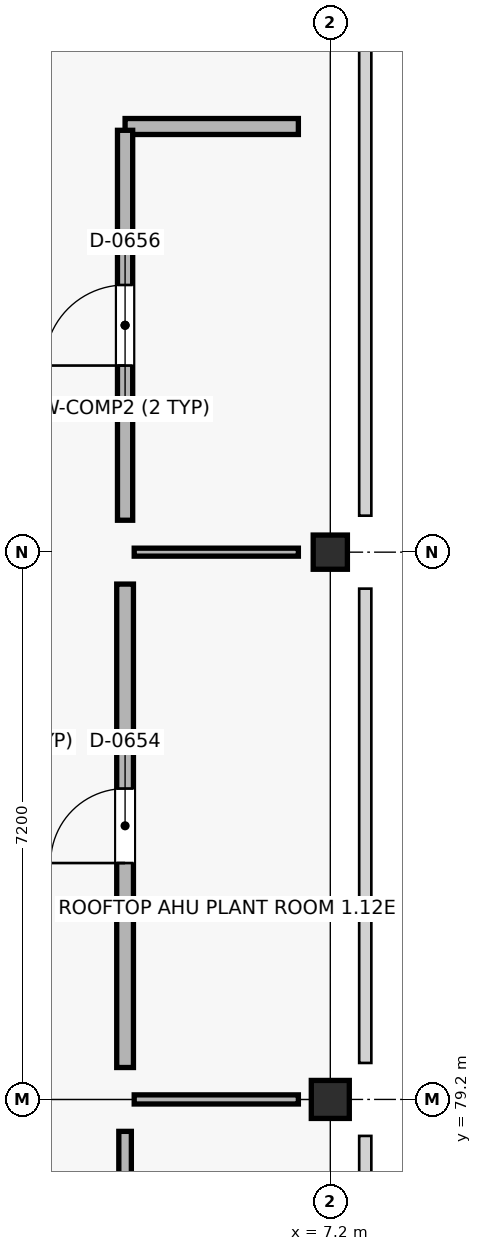
"""IFC4 building model, lengths in metres.
Left out: names, types, materials, properties, quantities, classifications, styles, units other than length and angle.
Written with IfcOpenShell. Run it as: python <this file> out.ifc"""

import sys

from ifc_helpers import new_model, si_unit, direction, frame, frame_2d, origin, origin_2d, place, context, subcontext, project, spatial, rectangle, extrude, element, fill, save


model = new_model("IFC4")
c1 = context("Model", 3, precision=1e-05, world=origin(), true_north=direction((0.0, 1.0)))
c2 = subcontext(c1, "Body", "Model", "MODEL_VIEW")
j1 = project(units=[si_unit("LENGTHUNIT", "METRE"), si_unit("PLANEANGLEUNIT", "RADIAN")], contexts=[c1])
p1 = place(None, origin())
s1 = spatial("IfcSite", under=j1, at=p1, CompositionType="ELEMENT")
p2 = place(p1, origin())
s2 = spatial("IfcBuilding", under=s1, at=p2, CompositionType="ELEMENT")
p3 = place(p2, frame((0.0, 0.0, 21.6)))
s3 = spatial("IfcBuildingStorey", under=s2, at=p3, CompositionType="ELEMENT", Elevation=21.6)
p4 = place(p3, frame((7.2, 79.2, 0.0), z_axis=(0.0, 0.0, 1.0), x_axis=(1.0, 0.0, 0.0)))
e1 = element("IfcColumn", 1, at=p4, inside=s3, PredefinedType="COLUMN", context=c2, shape_type="SweptSolid", body=[
    extrude(rectangle(XDim=0.5, YDim=0.5, at=origin_2d()), origin(), (0.0, 0.0, 1.0), 3.83),
])
p5 = place(p3, frame((7.2, 86.4, 0.0), z_axis=(0.0, 0.0, 1.0), x_axis=(1.0, 0.0, 0.0)))
e2 = element("IfcColumn", 2, at=p5, inside=s3, PredefinedType="COLUMN", context=c2, shape_type="SweptSolid", body=[
    extrude(rectangle(XDim=0.45, YDim=0.45, at=origin_2d()), origin(), (0.0, 0.0, 1.0), 3.83),
])
p6 = place(p3, frame((4.5, 72.42, 0.0), z_axis=(0.0, 0.0, 1.0), x_axis=(0.0, 1.0, 0.0)))
e3 = element("IfcWall", 3, at=p6, inside=s3, PredefinedType="PARTITIONING", context=c2, shape_type="SweptSolid", body=[
    extrude(rectangle(XDim=6.36, YDim=0.165, at=frame_2d((3.18, 0.0))), origin(), (0.0, 0.0, 1.0), 2.97),
])
p7 = place(p6, frame((2.73, 0.0, 0.0)))
e4 = element("IfcOpeningElement", 4, at=p7, cuts=e3, PredefinedType="OPENING", context=c2, shape_type="SweptSolid", body=[
    extrude(rectangle(XDim=0.9, YDim=2.09, at=frame_2d((0.45, 1.045))), frame((0.0, 0.093, 0.0), z_axis=(0.0, -1.0, 0.0), x_axis=(1.0, 0.0, 0.0)), (0.0, 0.0, 1.0), 0.185),
])
p8 = place(p3, frame((4.62, 79.2, 0.0), z_axis=(0.0, 0.0, 1.0), x_axis=(1.0, 0.0, 0.0)))
e5 = element("IfcWall", 5, at=p8, inside=s3, PredefinedType="PARTITIONING", context=c2, shape_type="SweptSolid", body=[
    extrude(rectangle(XDim=2.16, YDim=0.12, at=frame_2d((1.08, 0.0))), origin(), (0.0, 0.0, 1.0), 2.97),
])
p9 = place(p3, frame((4.5, 79.62, 0.0), z_axis=(0.0, 0.0, 1.0), x_axis=(0.0, 1.0, 0.0)))
e6 = element("IfcWall", 6, at=p9, inside=s3, PredefinedType="SOLIDWALL", context=c2, shape_type="SweptSolid", body=[
    extrude(rectangle(XDim=6.36, YDim=0.22, at=frame_2d((3.18, 0.0))), origin(), (0.0, 0.0, 1.0), 2.97),
])
p10 = place(p9, frame((2.69, 0.0, 0.0)))
e7 = element("IfcOpeningElement", 7, at=p10, cuts=e6, PredefinedType="OPENING", context=c2, shape_type="SweptSolid", body=[
    extrude(rectangle(XDim=0.98, YDim=2.09, at=frame_2d((0.49, 1.045))), frame((0.0, 0.12, 0.0), z_axis=(0.0, -1.0, 0.0), x_axis=(1.0, 0.0, 0.0)), (0.0, 0.0, 1.0), 0.24),
])
p11 = place(p3, frame((4.62, 86.4, 0.0), z_axis=(0.0, 0.0, 1.0), x_axis=(1.0, 0.0, 0.0)))
e8 = element("IfcWall", 8, at=p11, inside=s3, PredefinedType="PARTITIONING", context=c2, shape_type="SweptSolid", body=[
    extrude(rectangle(XDim=2.16, YDim=0.105, at=frame_2d((1.08, 0.0))), origin(), (0.0, 0.0, 1.0), 2.97),
])
p12 = place(p3, frame((4.5, 92.0, 0.0), z_axis=(0.0, 0.0, 1.0), x_axis=(1.0, 0.0, 0.0)))
e9 = element("IfcWall", 9, at=p12, inside=s3, PredefinedType="PLUMBINGWALL", context=c2, shape_type="SweptSolid", body=[
    extrude(rectangle(XDim=2.28, YDim=0.21, at=frame_2d((1.14, 0.0))), origin(), (0.0, 0.0, 1.0), 2.97),
])
p13 = place(p3, frame((4.5, 86.82, 0.0), z_axis=(0.0, 0.0, 1.0), x_axis=(0.0, 1.0, 0.0)))
e10 = element("IfcWall", 10, at=p13, inside=s3, PredefinedType="SOLIDWALL", context=c2, shape_type="SweptSolid", body=[
    extrude(rectangle(XDim=5.13, YDim=0.2, at=frame_2d((2.565, 0.0))), origin(), (0.0, 0.0, 1.0), 2.97),
])
p14 = place(p13, frame((2.035, 0.0, 0.0)))
e11 = element("IfcOpeningElement", 11, at=p14, cuts=e10, PredefinedType="OPENING", context=c2, shape_type="SweptSolid", body=[
    extrude(rectangle(XDim=1.06, YDim=2.09, at=frame_2d((0.53, 1.045))), frame((0.0, 0.11, 0.0), z_axis=(0.0, -1.0, 0.0), x_axis=(1.0, 0.0, 0.0)), (0.0, 0.0, 1.0), 0.22),
])
p15 = place(p10, origin())
e12 = element("IfcDoor", 12, at=p15, inside=s3, OperationType="SINGLE_SWING_LEFT", PredefinedType="DOOR", context=c2, shape_type="SweptSolid", body=[
    extrude(rectangle(XDim=0.98, YDim=2.09, at=frame_2d((0.49, 1.045))), frame((0.0, 0.025, 0.0), z_axis=(0.0, -1.0, 0.0), x_axis=(1.0, 0.0, 0.0)), (0.0, 0.0, 1.0), 0.05),
])
fill(e7, e12)
p16 = place(p14, origin())
e13 = element("IfcDoor", 13, at=p16, inside=s3, OperationType="SINGLE_SWING_LEFT", PredefinedType="DOOR", context=c2, shape_type="SweptSolid", body=[
    extrude(rectangle(XDim=1.06, YDim=2.09, at=frame_2d((0.53, 1.045))), frame((0.0, 0.025, 0.0), z_axis=(0.0, -1.0, 0.0), x_axis=(1.0, 0.0, 0.0)), (0.0, 0.0, 1.0), 0.05),
])
fill(e11, e13)
save(model, sys.argv[1])
